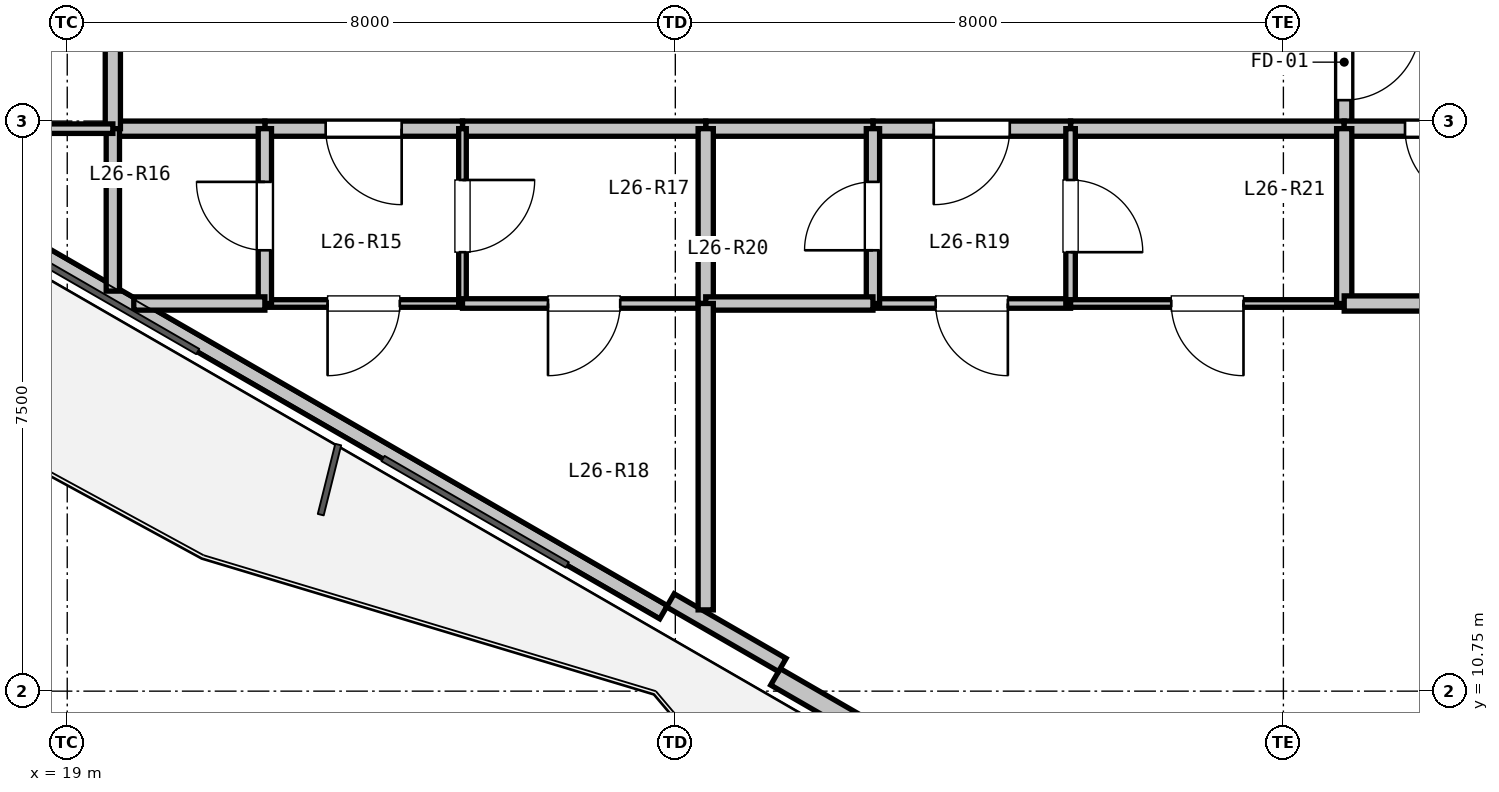
"""IFC4 building model, lengths in metres.
Left out: names, types, materials, properties, quantities, classifications, styles, units other than length and angle.
Written with IfcOpenShell. Run it as: python <this file> out.ifc"""

import sys

from ifc_helpers import new_model, si_unit, direction, frame, frame_2d, origin, place, context, subcontext, project, spatial, rectangle, extrude, element, fill, save


model = new_model("IFC4")
c1 = context("Model", 3, precision=1e-05, world=origin(), true_north=direction((0.0, 1.0)))
c2 = subcontext(c1, "Body", "Model", "MODEL_VIEW")
j1 = project(units=[si_unit("LENGTHUNIT", "METRE"), si_unit("PLANEANGLEUNIT", "RADIAN")], contexts=[c1])
p1 = place(None, origin())
s1 = spatial("IfcSite", under=j1, at=p1, CompositionType="ELEMENT")
p2 = place(p1, origin())
s2 = spatial("IfcBuilding", under=s1, at=p2, CompositionType="ELEMENT")
p3 = place(p2, frame((0.0, 0.0, 96.6)))
s3 = spatial("IfcBuildingStorey", under=s2, at=p3, CompositionType="ELEMENT", Elevation=96.6)
p4 = place(p3, frame((38.649, 4.973, 0.0), z_axis=(0.0, 0.0, 1.0), x_axis=(-0.866023023012, 0.500004123596, 0.0)))
e1 = element("IfcWall", 1, at=p4, inside=s3, PredefinedType="SOLIDWALL", context=c2, shape_type="SweptSolid", body=[
    extrude(rectangle(XDim=11.93, YDim=0.25, at=frame_2d((5.965, 0.0))), origin(), (0.0, 0.0, 1.0), 2.67),
])
p5 = place(p4, frame((7.616, 0.0, 0.0)))
e2 = element("IfcOpeningElement", 2, at=p5, cuts=e1, PredefinedType="OPENING", context=c2, shape_type="SweptSolid", body=[
    extrude(rectangle(XDim=1.0, YDim=2.1, at=frame_2d((0.5, 1.05))), frame((0.0, 0.135, 0.0), z_axis=(0.0, -1.0, 0.0), x_axis=(1.0, 0.0, 0.0)), (0.0, 0.0, 1.0), 0.27),
])
p6 = place(p3, frame((26.845, 11.788, 0.0), z_axis=(0.0, 0.0, 1.0), x_axis=(-0.866027010039, 0.499997217876, 0.0)))
e3 = element("IfcWall", 3, at=p6, inside=s3, PredefinedType="PARAPET", context=c2, shape_type="SweptSolid", body=[
    extrude(rectangle(XDim=11.229, YDim=0.2, at=frame_2d((5.615, 0.0))), origin(), (0.0, 0.0, 1.0), 0.2),
])
p7 = place(p3, frame((28.407, 11.094, 0.0), z_axis=(0.0, 0.0, 1.0), x_axis=(-0.86605165483, 0.499954529098, 0.0)))
e4 = element("IfcWall", 4, at=p7, inside=s3, PredefinedType="PARAPET", context=c2, shape_type="SweptSolid", body=[
    extrude(rectangle(XDim=1.7, YDim=0.2, at=frame_2d((0.85, 0.0))), origin(), (0.0, 0.0, 1.0), 2.67),
])
p8 = place(p3, frame((35.8, 19.9, 0.0), z_axis=(0.0, 0.0, 1.0), x_axis=(0.0, -1.0, 0.0)))
e5 = element("IfcWall", 5, at=p8, inside=s3, PredefinedType="PARTITIONING", context=c2, shape_type="SweptSolid", body=[
    extrude(rectangle(XDim=1.75, YDim=0.2, at=frame_2d((0.875, 0.0))), origin(), (0.0, 0.0, 1.0), 3.05),
])
p9 = place(p8, frame((0.375, 0.0, 0.0)))
e6 = element("IfcOpeningElement", 6, at=p9, cuts=e5, PredefinedType="OPENING", context=c2, shape_type="SweptSolid", body=[
    extrude(rectangle(XDim=1.0, YDim=2.15, at=frame_2d((0.5, 1.075))), frame((0.0, 0.11, 0.0), z_axis=(0.0, -1.0, 0.0), x_axis=(1.0, 0.0, 0.0)), (0.0, 0.0, 1.0), 0.22),
])
p10 = place(p3, frame((35.8, 18.15, 0.0), z_axis=(0.0, 0.0, 1.0), x_axis=(-1.0, 0.0, 0.0)))
e7 = element("IfcWall", 7, at=p10, inside=s3, PredefinedType="PARTITIONING", context=c2, shape_type="SweptSolid", body=[
    extrude(rectangle(XDim=3.6, YDim=0.2, at=frame_2d((1.8, 0.0))), origin(), (0.0, 0.0, 1.0), 3.05),
])
p11 = place(p3, frame((32.2, 18.15, 0.0), z_axis=(0.0, 0.0, 1.0), x_axis=(-1.0, 0.0, 0.0)))
e8 = element("IfcWall", 8, at=p11, inside=s3, PredefinedType="PARTITIONING", context=c2, shape_type="SweptSolid", body=[
    extrude(rectangle(XDim=2.6, YDim=0.2, at=frame_2d((1.3, 0.0))), origin(), (0.0, 0.0, 1.0), 3.05),
])
p12 = place(p11, frame((0.8, 0.0, 0.0)))
e9 = element("IfcOpeningElement", 9, at=p12, cuts=e8, PredefinedType="OPENING", context=c2, shape_type="SweptSolid", body=[
    extrude(rectangle(XDim=1.0, YDim=2.15, at=frame_2d((0.5, 1.075))), frame((0.0, 0.11, 0.0), z_axis=(0.0, -1.0, 0.0), x_axis=(1.0, 0.0, 0.0)), (0.0, 0.0, 1.0), 0.22),
])
p13 = place(p3, frame((29.6, 18.15, 0.0), z_axis=(0.0, 0.0, 1.0), x_axis=(-1.0, 0.0, 0.0)))
e10 = element("IfcWall", 10, at=p13, inside=s3, PredefinedType="PARTITIONING", context=c2, shape_type="SweptSolid", body=[
    extrude(rectangle(XDim=2.2, YDim=0.2, at=frame_2d((1.1, 0.0))), origin(), (0.0, 0.0, 1.0), 3.05),
])
p14 = place(p3, frame((27.4, 18.15, 0.0), z_axis=(0.0, 0.0, 1.0), x_axis=(-1.0, 0.0, 0.0)))
e11 = element("IfcWall", 11, at=p14, inside=s3, PredefinedType="PARTITIONING", context=c2, shape_type="SweptSolid", body=[
    extrude(rectangle(XDim=3.2, YDim=0.2, at=frame_2d((1.6, 0.0))), origin(), (0.0, 0.0, 1.0), 2.423),
])
p15 = place(p3, frame((24.2, 18.15, 0.0), z_axis=(0.0, 0.0, 1.0), x_axis=(-1.0, 0.0, 0.0)))
e12 = element("IfcWall", 12, at=p15, inside=s3, PredefinedType="PARTITIONING", context=c2, shape_type="SweptSolid", body=[
    extrude(rectangle(XDim=2.6, YDim=0.2, at=frame_2d((1.3, 0.0))), origin(), (0.0, 0.0, 1.0), 2.423),
])
p16 = place(p15, frame((0.8, 0.0, 0.0)))
e13 = element("IfcOpeningElement", 13, at=p16, cuts=e12, PredefinedType="OPENING", context=c2, shape_type="SweptSolid", body=[
    extrude(rectangle(XDim=1.0, YDim=2.15, at=frame_2d((0.5, 1.075))), frame((0.0, 0.11, 0.0), z_axis=(0.0, -1.0, 0.0), x_axis=(1.0, 0.0, 0.0)), (0.0, 0.0, 1.0), 0.22),
])
p17 = place(p3, frame((21.6, 18.15, 0.0), z_axis=(0.0, 0.0, 1.0), x_axis=(-1.0, 0.0, 0.0)))
e14 = element("IfcWall", 14, at=p17, inside=s3, PredefinedType="PARTITIONING", context=c2, shape_type="SweptSolid", body=[
    extrude(rectangle(XDim=2.0, YDim=0.2, at=frame_2d((1.0, 0.0))), origin(), (0.0, 0.0, 1.0), 3.05),
])
p18 = place(p3, frame((19.6, 18.15, 0.0), z_axis=(0.0, 0.0, 1.0), x_axis=(0.0, 1.0, 0.0)))
e15 = element("IfcWall", 15, at=p18, inside=s3, PredefinedType="PARTITIONING", context=c2, shape_type="SweptSolid", body=[
    extrude(rectangle(XDim=3.65, YDim=0.2, at=frame_2d((1.825, 0.0))), origin(), (0.0, 0.0, 1.0), 2.423),
])
p19 = place(p18, frame((1.325, 0.0, 0.0)))
e16 = element("IfcOpeningElement", 16, at=p19, cuts=e15, PredefinedType="OPENING", context=c2, shape_type="SweptSolid", body=[
    extrude(rectangle(XDim=1.0, YDim=2.15, at=frame_2d((0.5, 1.075))), frame((0.0, 0.11, 0.0), z_axis=(0.0, -1.0, 0.0), x_axis=(1.0, 0.0, 0.0)), (0.0, 0.0, 1.0), 0.22),
])
p20 = place(p3, frame((38.4, 18.15, 0.0), z_axis=(0.0, 0.0, 1.0), x_axis=(-1.0, 0.0, 0.0)))
e17 = element("IfcWall", 17, at=p20, inside=s3, PredefinedType="PARTITIONING", context=c2, shape_type="SweptSolid", body=[
    extrude(rectangle(XDim=2.6, YDim=0.2, at=frame_2d((1.3, 0.0))), origin(), (0.0, 0.0, 1.0), 2.423),
])
p21 = place(p20, frame((0.8, 0.0, 0.0)))
e18 = element("IfcOpeningElement", 18, at=p21, cuts=e17, PredefinedType="OPENING", context=c2, shape_type="SweptSolid", body=[
    extrude(rectangle(XDim=1.0, YDim=2.15, at=frame_2d((0.5, 1.075))), frame((0.0, 0.11, 0.0), z_axis=(0.0, -1.0, 0.0), x_axis=(1.0, 0.0, 0.0)), (0.0, 0.0, 1.0), 0.22),
])
p22 = place(p3, frame((24.2, 15.85, 0.0), z_axis=(0.0, 0.0, 1.0), x_axis=(-1.0, 0.0, 0.0)))
e19 = element("IfcWall", 19, at=p22, inside=s3, PredefinedType="PARTITIONING", context=c2, shape_type="SweptSolid", body=[
    extrude(rectangle(XDim=2.6, YDim=0.1, at=frame_2d((1.3, 0.0))), origin(), (0.0, 0.0, 1.0), 3.05),
])
p23 = place(p22, frame((0.825, 0.0, 0.0)))
e20 = element("IfcOpeningElement", 20, at=p23, cuts=e19, PredefinedType="OPENING", context=c2, shape_type="SweptSolid", body=[
    extrude(rectangle(XDim=0.95, YDim=2.1, at=frame_2d((0.475, 1.05))), frame((0.0, 0.06, 0.0), z_axis=(0.0, -1.0, 0.0), x_axis=(1.0, 0.0, 0.0)), (0.0, 0.0, 1.0), 0.12),
])
p24 = place(p3, frame((21.6, 15.85, 0.0), z_axis=(0.0, 0.0, 1.0), x_axis=(0.0, 1.0, 0.0)))
e21 = element("IfcWall", 21, at=p24, inside=s3, PredefinedType="PLUMBINGWALL", context=c2, shape_type="SweptSolid", body=[
    extrude(rectangle(XDim=2.3, YDim=0.175, at=frame_2d((1.15, 0.0))), origin(), (0.0, 0.0, 1.0), 3.05),
])
p25 = place(p24, frame((0.7, 0.0, 0.0)))
e22 = element("IfcOpeningElement", 22, at=p25, cuts=e21, PredefinedType="OPENING", context=c2, shape_type="SweptSolid", body=[
    extrude(rectangle(XDim=0.9, YDim=2.1, at=frame_2d((0.45, 1.05))), frame((0.0, 0.097, 0.0), z_axis=(0.0, -1.0, 0.0), x_axis=(1.0, 0.0, 0.0)), (0.0, 0.0, 1.0), 0.195),
])
p26 = place(p3, frame((24.2, 18.15, 0.0), z_axis=(0.0, 0.0, 1.0), x_axis=(0.0, -1.0, 0.0)))
e23 = element("IfcWall", 23, at=p26, inside=s3, PredefinedType="PARTITIONING", context=c2, shape_type="SweptSolid", body=[
    extrude(rectangle(XDim=2.3, YDim=0.1, at=frame_2d((1.15, 0.0))), origin(), (0.0, 0.0, 1.0), 2.423),
])
p27 = place(p26, frame((0.675, 0.0, 0.0)))
e24 = element("IfcOpeningElement", 24, at=p27, cuts=e23, PredefinedType="OPENING", context=c2, shape_type="SweptSolid", body=[
    extrude(rectangle(XDim=0.95, YDim=2.1, at=frame_2d((0.475, 1.05))), frame((0.0, 0.06, 0.0), z_axis=(0.0, -1.0, 0.0), x_axis=(1.0, 0.0, 0.0)), (0.0, 0.0, 1.0), 0.12),
])
p28 = place(p3, frame((32.2, 15.85, 0.0), z_axis=(0.0, 0.0, 1.0), x_axis=(-1.0, 0.0, 0.0)))
e25 = element("IfcWall", 25, at=p28, inside=s3, PredefinedType="PARTITIONING", context=c2, shape_type="SweptSolid", body=[
    extrude(rectangle(XDim=2.6, YDim=0.125, at=frame_2d((1.3, 0.0))), origin(), (0.0, 0.0, 1.0), 3.05),
])
p29 = place(p28, frame((0.825, 0.0, 0.0)))
e26 = element("IfcOpeningElement", 26, at=p29, cuts=e25, PredefinedType="OPENING", context=c2, shape_type="SweptSolid", body=[
    extrude(rectangle(XDim=0.95, YDim=2.1, at=frame_2d((0.475, 1.05))), frame((0.0, 0.073, 0.0), z_axis=(0.0, -1.0, 0.0), x_axis=(1.0, 0.0, 0.0)), (0.0, 0.0, 1.0), 0.145),
])
p30 = place(p3, frame((29.6, 15.85, 0.0), z_axis=(0.0, 0.0, 1.0), x_axis=(0.0, 1.0, 0.0)))
e27 = element("IfcWall", 27, at=p30, inside=s3, PredefinedType="PLUMBINGWALL", context=c2, shape_type="SweptSolid", body=[
    extrude(rectangle(XDim=2.3, YDim=0.175, at=frame_2d((1.15, 0.0))), origin(), (0.0, 0.0, 1.0), 3.05),
])
p31 = place(p30, frame((0.7, 0.0, 0.0)))
e28 = element("IfcOpeningElement", 28, at=p31, cuts=e27, PredefinedType="OPENING", context=c2, shape_type="SweptSolid", body=[
    extrude(rectangle(XDim=0.9, YDim=2.1, at=frame_2d((0.45, 1.05))), frame((0.0, 0.097, 0.0), z_axis=(0.0, -1.0, 0.0), x_axis=(1.0, 0.0, 0.0)), (0.0, 0.0, 1.0), 0.195),
])
p32 = place(p3, frame((32.2, 18.15, 0.0), z_axis=(0.0, 0.0, 1.0), x_axis=(0.0, -1.0, 0.0)))
e29 = element("IfcWall", 29, at=p32, inside=s3, PredefinedType="PARTITIONING", context=c2, shape_type="SweptSolid", body=[
    extrude(rectangle(XDim=2.3, YDim=0.125, at=frame_2d((1.15, 0.0))), origin(), (0.0, 0.0, 1.0), 3.05),
])
p33 = place(p32, frame((0.675, 0.0, 0.0)))
e30 = element("IfcOpeningElement", 30, at=p33, cuts=e29, PredefinedType="OPENING", context=c2, shape_type="SweptSolid", body=[
    extrude(rectangle(XDim=0.95, YDim=2.1, at=frame_2d((0.475, 1.05))), frame((0.0, 0.073, 0.0), z_axis=(0.0, -1.0, 0.0), x_axis=(1.0, 0.0, 0.0)), (0.0, 0.0, 1.0), 0.145),
])
p34 = place(p3, frame((21.6, 15.85, 0.0), z_axis=(0.0, 0.0, 1.0), x_axis=(-1.0, 0.0, 0.0)))
e31 = element("IfcWall", 31, at=p34, inside=s3, PredefinedType="PLUMBINGWALL", context=c2, shape_type="SweptSolid", body=[
    extrude(rectangle(XDim=1.725, YDim=0.175, at=frame_2d((0.862, 0.0))), origin(), (0.0, 0.0, 1.0), 2.365),
])
p35 = place(p3, frame((19.6, 16.013, 0.0), z_axis=(0.0, 0.0, 1.0), x_axis=(0.0, 1.0, 0.0)))
e32 = element("IfcWall", 32, at=p35, inside=s3, PredefinedType="PLUMBINGWALL", context=c2, shape_type="SweptSolid", body=[
    extrude(rectangle(XDim=2.137, YDim=0.175, at=frame_2d((1.068, 0.0))), origin(), (0.0, 0.0, 1.0), 2.365),
])
p36 = place(p3, frame((27.4, 15.85, 0.0), z_axis=(0.0, 0.0, 1.0), x_axis=(-1.0, 0.0, 0.0)))
e33 = element("IfcWall", 33, at=p36, inside=s3, PredefinedType="PARTITIONING", context=c2, shape_type="SweptSolid", body=[
    extrude(rectangle(XDim=3.2, YDim=0.125, at=frame_2d((1.6, 0.0))), origin(), (0.0, 0.0, 1.0), 2.423),
])
p37 = place(p36, frame((1.125, 0.0, 0.0)))
e34 = element("IfcOpeningElement", 34, at=p37, cuts=e33, PredefinedType="OPENING", context=c2, shape_type="SweptSolid", body=[
    extrude(rectangle(XDim=0.95, YDim=2.1, at=frame_2d((0.475, 1.05))), frame((0.0, 0.073, 0.0), z_axis=(0.0, -1.0, 0.0), x_axis=(1.0, 0.0, 0.0)), (0.0, 0.0, 1.0), 0.145),
])
p38 = place(p3, frame((27.4, 18.15, 0.0), z_axis=(0.0, 0.0, 1.0), x_axis=(0.0, -1.0, 0.0)))
e35 = element("IfcWall", 35, at=p38, inside=s3, PredefinedType="PARTITIONING", context=c2, shape_type="SweptSolid", body=[
    extrude(rectangle(XDim=2.3, YDim=0.2, at=frame_2d((1.15, 0.0))), origin(), (0.0, 0.0, 1.0), 3.05),
])
p39 = place(p3, frame((29.6, 15.85, 0.0), z_axis=(0.0, 0.0, 1.0), x_axis=(-1.0, 0.0, 0.0)))
e36 = element("IfcWall", 36, at=p39, inside=s3, PredefinedType="PLUMBINGWALL", context=c2, shape_type="SweptSolid", body=[
    extrude(rectangle(XDim=2.2, YDim=0.175, at=frame_2d((1.1, 0.0))), origin(), (0.0, 0.0, 1.0), 3.05),
])
p40 = place(p3, frame((35.8, 15.85, 0.0), z_axis=(0.0, 0.0, 1.0), x_axis=(-1.0, 0.0, 0.0)))
e37 = element("IfcWall", 37, at=p40, inside=s3, PredefinedType="PARTITIONING", context=c2, shape_type="SweptSolid", body=[
    extrude(rectangle(XDim=3.6, YDim=0.1, at=frame_2d((1.8, 0.0))), origin(), (0.0, 0.0, 1.0), 3.05),
])
p41 = place(p40, frame((1.325, 0.0, 0.0)))
e38 = element("IfcOpeningElement", 38, at=p41, cuts=e37, PredefinedType="OPENING", context=c2, shape_type="SweptSolid", body=[
    extrude(rectangle(XDim=0.95, YDim=2.1, at=frame_2d((0.475, 1.05))), frame((0.0, 0.06, 0.0), z_axis=(0.0, -1.0, 0.0), x_axis=(1.0, 0.0, 0.0)), (0.0, 0.0, 1.0), 0.12),
])
p42 = place(p3, frame((35.8, 18.15, 0.0), z_axis=(0.0, 0.0, 1.0), x_axis=(0.0, -1.0, 0.0)))
e39 = element("IfcWall", 39, at=p42, inside=s3, PredefinedType="PARTITIONING", context=c2, shape_type="SweptSolid", body=[
    extrude(rectangle(XDim=2.3, YDim=0.2, at=frame_2d((1.15, 0.0))), origin(), (0.0, 0.0, 1.0), 3.05),
])
p43 = place(p3, frame((42.885, 15.85, 0.0), z_axis=(0.0, 0.0, 1.0), x_axis=(-1.0, 0.0, 0.0)))
e40 = element("IfcWall", 40, at=p43, inside=s3, PredefinedType="PARTITIONING", context=c2, shape_type="SweptSolid", body=[
    extrude(rectangle(XDim=7.085, YDim=0.2, at=frame_2d((3.543, 0.0))), origin(), (0.0, 0.0, 1.0), 2.365),
])
p44 = place(p3, frame((19.6, 18.15, 0.0), z_axis=(0.0, 0.0, 1.0), x_axis=(-1.0, 0.0, 0.0)))
e41 = element("IfcWall", 41, at=p44, inside=s3, PredefinedType="PARTITIONING", context=c2, shape_type="SweptSolid", body=[
    extrude(rectangle(XDim=2.6, YDim=0.125, at=frame_2d((1.3, 0.0))), origin(), (0.0, 0.0, 1.0), 2.365),
])
p45 = place(p3, frame((27.4, 15.85, 0.0), z_axis=(0.0, 0.0, 1.0), x_axis=(0.0, -1.0, 0.0)))
e42 = element("IfcWall", 42, at=p45, inside=s3, PredefinedType="PARTITIONING", context=c2, shape_type="SweptSolid", body=[
    extrude(rectangle(XDim=4.031, YDim=0.2, at=frame_2d((2.016, 0.0))), origin(), (0.0, 0.0, 1.0), 2.365),
])
p46 = place(p9, origin())
e43 = element("IfcDoor", 43, at=p46, inside=s3, OperationType="SINGLE_SWING_LEFT", PredefinedType="DOOR", context=c2, shape_type="SweptSolid", body=[
    extrude(rectangle(XDim=1.0, YDim=2.15, at=frame_2d((0.5, 1.075))), frame((0.0, 0.025, 0.0), z_axis=(0.0, -1.0, 0.0), x_axis=(1.0, 0.0, 0.0)), (0.0, 0.0, 1.0), 0.05),
])
fill(e6, e43)
p47 = place(p16, origin())
e44 = element("IfcDoor", 44, at=p47, inside=s3, OperationType="SINGLE_SWING_LEFT", PredefinedType="DOOR", context=c2, shape_type="SweptSolid", body=[
    extrude(rectangle(XDim=1.0, YDim=2.15, at=frame_2d((0.5, 1.075))), frame((0.0, 0.025, 0.0), z_axis=(0.0, -1.0, 0.0), x_axis=(1.0, 0.0, 0.0)), (0.0, 0.0, 1.0), 0.05),
])
fill(e13, e44)
p48 = place(p12, origin())
e45 = element("IfcDoor", 45, at=p48, inside=s3, OperationType="SINGLE_SWING_RIGHT", PredefinedType="DOOR", context=c2, shape_type="SweptSolid", body=[
    extrude(rectangle(XDim=1.0, YDim=2.15, at=frame_2d((0.5, 1.075))), frame((0.0, 0.025, 0.0), z_axis=(0.0, -1.0, 0.0), x_axis=(1.0, 0.0, 0.0)), (0.0, 0.0, 1.0), 0.05),
])
fill(e9, e45)
p49 = place(p21, origin())
e46 = element("IfcDoor", 46, at=p49, inside=s3, OperationType="SINGLE_SWING_LEFT", PredefinedType="DOOR", context=c2, shape_type="SweptSolid", body=[
    extrude(rectangle(XDim=1.0, YDim=2.15, at=frame_2d((0.5, 1.075))), frame((0.0, 0.025, 0.0), z_axis=(0.0, -1.0, 0.0), x_axis=(1.0, 0.0, 0.0)), (0.0, 0.0, 1.0), 0.05),
])
fill(e18, e46)
p50 = place(p25, origin())
e47 = element("IfcDoor", 47, at=p50, inside=s3, OperationType="SINGLE_SWING_RIGHT", PredefinedType="DOOR", context=c2, shape_type="SweptSolid", body=[
    extrude(rectangle(XDim=0.9, YDim=2.1, at=frame_2d((0.45, 1.05))), frame((0.0, 0.025, 0.0), z_axis=(0.0, -1.0, 0.0), x_axis=(1.0, 0.0, 0.0)), (0.0, 0.0, 1.0), 0.05),
])
fill(e22, e47)
p51 = place(p27, origin())
e48 = element("IfcDoor", 48, at=p51, inside=s3, OperationType="SINGLE_SWING_LEFT", PredefinedType="DOOR", context=c2, shape_type="SweptSolid", body=[
    extrude(rectangle(XDim=0.95, YDim=2.1, at=frame_2d((0.475, 1.05))), frame((0.0, 0.025, 0.0), z_axis=(0.0, -1.0, 0.0), x_axis=(1.0, 0.0, 0.0)), (0.0, 0.0, 1.0), 0.05),
])
fill(e24, e48)
p52 = place(p23, origin())
e49 = element("IfcDoor", 49, at=p52, inside=s3, OperationType="SINGLE_SWING_RIGHT", PredefinedType="DOOR", context=c2, shape_type="SweptSolid", body=[
    extrude(rectangle(XDim=0.95, YDim=2.1, at=frame_2d((0.475, 1.05))), frame((0.0, 0.025, 0.0), z_axis=(0.0, -1.0, 0.0), x_axis=(1.0, 0.0, 0.0)), (0.0, 0.0, 1.0), 0.05),
])
fill(e20, e49)
p53 = place(p31, origin())
e50 = element("IfcDoor", 50, at=p53, inside=s3, OperationType="SINGLE_SWING_LEFT", PredefinedType="DOOR", context=c2, shape_type="SweptSolid", body=[
    extrude(rectangle(XDim=0.9, YDim=2.1, at=frame_2d((0.45, 1.05))), frame((0.0, 0.025, 0.0), z_axis=(0.0, -1.0, 0.0), x_axis=(1.0, 0.0, 0.0)), (0.0, 0.0, 1.0), 0.05),
])
fill(e28, e50)
p54 = place(p33, origin())
e51 = element("IfcDoor", 51, at=p54, inside=s3, OperationType="SINGLE_SWING_RIGHT", PredefinedType="DOOR", context=c2, shape_type="SweptSolid", body=[
    extrude(rectangle(XDim=0.95, YDim=2.1, at=frame_2d((0.475, 1.05))), frame((0.0, 0.025, 0.0), z_axis=(0.0, -1.0, 0.0), x_axis=(1.0, 0.0, 0.0)), (0.0, 0.0, 1.0), 0.05),
])
fill(e30, e51)
p55 = place(p29, origin())
e52 = element("IfcDoor", 52, at=p55, inside=s3, OperationType="SINGLE_SWING_LEFT", PredefinedType="DOOR", context=c2, shape_type="SweptSolid", body=[
    extrude(rectangle(XDim=0.95, YDim=2.1, at=frame_2d((0.475, 1.05))), frame((0.0, 0.025, 0.0), z_axis=(0.0, -1.0, 0.0), x_axis=(1.0, 0.0, 0.0)), (0.0, 0.0, 1.0), 0.05),
])
fill(e26, e52)
p56 = place(p37, origin())
e53 = element("IfcDoor", 53, at=p56, inside=s3, OperationType="SINGLE_SWING_RIGHT", PredefinedType="DOOR", context=c2, shape_type="SweptSolid", body=[
    extrude(rectangle(XDim=0.95, YDim=2.1, at=frame_2d((0.475, 1.05))), frame((0.0, 0.025, 0.0), z_axis=(0.0, -1.0, 0.0), x_axis=(1.0, 0.0, 0.0)), (0.0, 0.0, 1.0), 0.05),
])
fill(e34, e53)
p57 = place(p41, origin())
e54 = element("IfcDoor", 54, at=p57, inside=s3, OperationType="SINGLE_SWING_LEFT", PredefinedType="DOOR", context=c2, shape_type="SweptSolid", body=[
    extrude(rectangle(XDim=0.95, YDim=2.1, at=frame_2d((0.475, 1.05))), frame((0.0, 0.025, 0.0), z_axis=(0.0, -1.0, 0.0), x_axis=(1.0, 0.0, 0.0)), (0.0, 0.0, 1.0), 0.05),
])
fill(e38, e54)
save(model, sys.argv[1])
